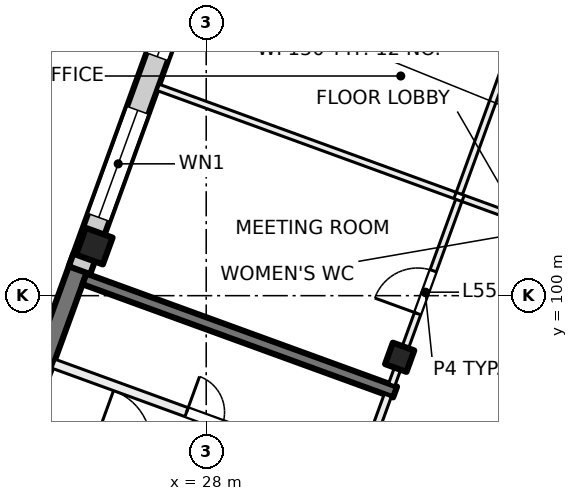
"""IFC4 building model, lengths in metres.
Left out: names, types, materials, properties, quantities, classifications, styles, units other than length and angle.
Written with IfcOpenShell. Run it as: python <this file> out.ifc"""

import sys

from ifc_helpers import new_model, si_unit, direction, frame, frame_2d, origin, origin_2d, place, context, subcontext, project, spatial, rectangle, extrude, element, fill, save


model = new_model("IFC4")
c1 = context("Model", 3, precision=1e-05, world=origin(), true_north=direction((0.0, 1.0)))
c2 = subcontext(c1, "Body", "Model", "MODEL_VIEW")
j1 = project(units=[si_unit("LENGTHUNIT", "METRE"), si_unit("PLANEANGLEUNIT", "RADIAN")], contexts=[c1])
p1 = place(None, origin())
s1 = spatial("IfcSite", under=j1, at=p1, CompositionType="ELEMENT")
p2 = place(p1, origin())
s2 = spatial("IfcBuilding", under=s1, at=p2, CompositionType="ELEMENT")
p3 = place(p2, frame((0.0, 0.0, 232.0)))
s3 = spatial("IfcBuildingStorey", under=s2, at=p3, CompositionType="ELEMENT", Elevation=232.0)
p4 = place(p3, frame((33.091, 98.379, 0.0), z_axis=(0.0, 0.0, 1.0), x_axis=(-0.342020143326, -0.939692620786, 0.0)))
e1 = element("IfcColumn", 1, at=p4, inside=s3, PredefinedType="COLUMN", context=c2, shape_type="SweptSolid", body=[
    extrude(rectangle(XDim=0.6, YDim=0.6, at=origin_2d()), origin(), (0.0, 0.0, 1.0), 4.0),
])
p5 = place(p3, frame((25.056, 101.303, 0.0), z_axis=(0.0, 0.0, 1.0), x_axis=(-0.342020143326, -0.939692620786, 0.0)))
e2 = element("IfcColumn", 2, at=p5, inside=s3, PredefinedType="COLUMN", context=c2, shape_type="SweptSolid", body=[
    extrude(rectangle(XDim=0.75, YDim=0.75, at=origin_2d()), origin(), (0.0, 0.0, 1.0), 4.0),
])
p6 = place(p3, frame((21.67, 92.585, 0.0), z_axis=(0.0, 0.0, 1.0), x_axis=(0.342035714298, 0.93968695327, 0.0)))
e3 = element("IfcWall", 3, at=p6, inside=s3, PredefinedType="SHEAR", context=c2, shape_type="SweptSolid", body=[
    extrude(rectangle(XDim=8.975, YDim=0.5, at=frame_2d((4.488, 0.0))), origin(), (0.0, 0.0, 1.0), 4.0),
])
p7 = place(p3, frame((32.971, 97.465, 0.0), z_axis=(0.0, 0.0, 1.0), x_axis=(-0.939695066972, 0.34201342241, 0.0)))
e4 = element("IfcWall", 4, at=p7, inside=s3, PredefinedType="SHEAR", context=c2, shape_type="SweptSolid", body=[
    extrude(rectangle(XDim=8.7, YDim=0.3, at=frame_2d((4.35, 0.0))), origin(), (0.0, 0.0, 1.0), 4.0),
])
p8 = place(p3, frame((24.666, 100.669, 0.0), z_axis=(0.0, 0.0, 1.0), x_axis=(0.34201964167, 0.939692803373, 0.0)))
e5 = element("IfcWall", 5, at=p8, inside=s3, PredefinedType="SOLIDWALL", context=c2, shape_type="SweptSolid", body=[
    extrude(rectangle(XDim=32.884, YDim=0.6, at=frame_2d((16.442, 0.0))), origin(), (0.0, 0.0, 1.0), 3.625),
])
p9 = place(p8, frame((1.48, 0.0, 0.9)))
e6 = element("IfcOpeningElement", 6, at=p9, cuts=e5, PredefinedType="OPENING", context=c2, shape_type="SweptSolid", body=[
    extrude(rectangle(XDim=3.0, YDim=2.4, at=frame_2d((1.5, 1.2))), frame((0.0, 0.31, 0.0), z_axis=(0.0, -1.0, 0.0), x_axis=(1.0, 0.0, 0.0)), (0.0, 0.0, 1.0), 0.62),
])
p10 = place(p8, frame((5.98, 0.0, 0.9)))
e7 = element("IfcOpeningElement", 7, at=p10, cuts=e5, PredefinedType="OPENING", context=c2, shape_type="SweptSolid", body=[
    extrude(rectangle(XDim=3.0, YDim=2.4, at=frame_2d((1.5, 1.2))), frame((0.0, 0.31, 0.0), z_axis=(0.0, -1.0, 0.0), x_axis=(1.0, 0.0, 0.0)), (0.0, 0.0, 1.0), 0.62),
])
p11 = place(p8, frame((10.48, 0.0, 0.9)))
e8 = element("IfcOpeningElement", 8, at=p11, cuts=e5, PredefinedType="OPENING", context=c2, shape_type="SweptSolid", body=[
    extrude(rectangle(XDim=3.0, YDim=2.4, at=frame_2d((1.5, 1.2))), frame((0.0, 0.31, 0.0), z_axis=(0.0, -1.0, 0.0), x_axis=(1.0, 0.0, 0.0)), (0.0, 0.0, 1.0), 0.62),
])
p12 = place(p8, frame((14.98, 0.0, 0.9)))
e9 = element("IfcOpeningElement", 9, at=p12, cuts=e5, PredefinedType="OPENING", context=c2, shape_type="SweptSolid", body=[
    extrude(rectangle(XDim=3.0, YDim=2.4, at=frame_2d((1.5, 1.2))), frame((0.0, 0.31, 0.0), z_axis=(0.0, -1.0, 0.0), x_axis=(1.0, 0.0, 0.0)), (0.0, 0.0, 1.0), 0.62),
])
p13 = place(p8, frame((19.48, 0.0, 0.9)))
e10 = element("IfcOpeningElement", 10, at=p13, cuts=e5, PredefinedType="OPENING", context=c2, shape_type="SweptSolid", body=[
    extrude(rectangle(XDim=3.0, YDim=2.4, at=frame_2d((1.5, 1.2))), frame((0.0, 0.31, 0.0), z_axis=(0.0, -1.0, 0.0), x_axis=(1.0, 0.0, 0.0)), (0.0, 0.0, 1.0), 0.62),
])
p14 = place(p8, frame((23.98, 0.0, 0.9)))
e11 = element("IfcOpeningElement", 11, at=p14, cuts=e5, PredefinedType="OPENING", context=c2, shape_type="SweptSolid", body=[
    extrude(rectangle(XDim=3.0, YDim=2.4, at=frame_2d((1.5, 1.2))), frame((0.0, 0.31, 0.0), z_axis=(0.0, -1.0, 0.0), x_axis=(1.0, 0.0, 0.0)), (0.0, 0.0, 1.0), 0.62),
])
p15 = place(p8, frame((28.48, 0.0, 0.9)))
e12 = element("IfcOpeningElement", 12, at=p15, cuts=e5, PredefinedType="OPENING", context=c2, shape_type="SweptSolid", body=[
    extrude(rectangle(XDim=3.0, YDim=2.4, at=frame_2d((1.5, 1.2))), frame((0.0, 0.31, 0.0), z_axis=(0.0, -1.0, 0.0), x_axis=(1.0, 0.0, 0.0)), (0.0, 0.0, 1.0), 0.62),
])
p16 = place(p3, frame((31.427, 93.663, 0.0), z_axis=(0.0, 0.0, 1.0), x_axis=(0.342030870568, 0.93968871632, 0.0)))
e13 = element("IfcWall", 13, at=p16, inside=s3, PredefinedType="PARTITIONING", context=c2, shape_type="SweptSolid", body=[
    extrude(rectangle(XDim=3.95, YDim=0.2, at=frame_2d((1.975, 0.0))), origin(), (0.0, 0.0, 1.0), 3.625),
])
p17 = place(p16, frame((0.3, 0.0, 0.0)))
e14 = element("IfcOpeningElement", 14, at=p17, cuts=e13, PredefinedType="OPENING", context=c2, shape_type="SweptSolid", body=[
    extrude(rectangle(XDim=1.2, YDim=2.1, at=frame_2d((0.6, 1.05))), frame((0.0, 0.11, 0.0), z_axis=(0.0, -1.0, 0.0), x_axis=(1.0, 0.0, 0.0)), (0.0, 0.0, 1.0), 0.22),
])
p18 = place(p3, frame((23.427, 96.682, 0.0), z_axis=(0.0, 0.0, 1.0), x_axis=(0.939690465531, -0.342026064782, 0.0)))
e15 = element("IfcWall", 15, at=p18, inside=s3, PredefinedType="PARTITIONING", context=c2, shape_type="SweptSolid", body=[
    extrude(rectangle(XDim=8.45, YDim=0.2, at=frame_2d((4.225, 0.0))), origin(), (0.0, 0.0, 1.0), 3.625),
])
p19 = place(p18, frame((1.725, 0.0, 0.0)))
e16 = element("IfcOpeningElement", 16, at=p19, cuts=e15, PredefinedType="OPENING", context=c2, shape_type="SweptSolid", body=[
    extrude(rectangle(XDim=1.5, YDim=2.1, at=frame_2d((0.75, 1.05))), frame((0.0, 0.11, 0.0), z_axis=(0.0, -1.0, 0.0), x_axis=(1.0, 0.0, 0.0)), (0.0, 0.0, 1.0), 0.22),
])
p20 = place(p3, frame((23.983, 98.208, 0.0), z_axis=(0.0, 0.0, 1.0), x_axis=(0.939699751196, -0.342000552051, 0.0)))
e17 = element("IfcWall", 17, at=p20, inside=s3, PredefinedType="PARTITIONING", context=c2, shape_type="SweptSolid", body=[
    extrude(rectangle(XDim=8.45, YDim=0.25, at=frame_2d((4.225, 0.0))), origin(), (0.0, 0.0, 1.0), 3.625),
])
p21 = place(p20, frame((3.725, 0.0, 0.0)))
e18 = element("IfcOpeningElement", 18, at=p21, cuts=e17, PredefinedType="OPENING", context=c2, shape_type="SweptSolid", body=[
    extrude(rectangle(XDim=1.0, YDim=2.1, at=frame_2d((0.5, 1.05))), frame((0.0, 0.135, 0.0), z_axis=(0.0, -1.0, 0.0), x_axis=(1.0, 0.0, 0.0)), (0.0, 0.0, 1.0), 0.27),
])
p22 = place(p3, frame((26.736, 105.48, 0.0), z_axis=(0.0, 0.0, 1.0), x_axis=(0.939705074886, -0.341985924028, 0.0)))
e19 = element("IfcWall", 19, at=p22, inside=s3, PredefinedType="PARTITIONING", context=c2, shape_type="SweptSolid", body=[
    extrude(rectangle(XDim=8.313, YDim=0.175, at=frame_2d((4.157, 0.0))), origin(), (0.0, 0.0, 1.0), 3.625),
])
p23 = place(p3, frame((32.881, 97.657, 0.0), z_axis=(0.0, 0.0, 1.0), x_axis=(0.342058204353, 0.939678766832, 0.0)))
e20 = element("IfcWall", 20, at=p23, inside=s3, PredefinedType="PARTITIONING", context=c2, shape_type="SweptSolid", body=[
    extrude(rectangle(XDim=5.163, YDim=0.175, at=frame_2d((2.581, 0.0))), origin(), (0.0, 0.0, 1.0), 3.625),
])
p24 = place(p23, frame((1.991, 0.0, 0.0)))
e21 = element("IfcOpeningElement", 21, at=p24, cuts=e20, PredefinedType="OPENING", context=c2, shape_type="SweptSolid", body=[
    extrude(rectangle(XDim=1.2, YDim=2.1, at=frame_2d((0.6, 1.05))), frame((0.0, 0.097, 0.0), z_axis=(0.0, -1.0, 0.0), x_axis=(1.0, 0.0, 0.0)), (0.0, 0.0, 1.0), 0.195),
])
p25 = place(p3, frame((34.759, 102.56, 0.0), z_axis=(0.0, 0.0, 1.0), x_axis=(0.939770757411, -0.341805388365, 0.0)))
e22 = element("IfcWall", 22, at=p25, inside=s3, PredefinedType="PARTITIONING", context=c2, shape_type="SweptSolid", body=[
    extrude(rectangle(XDim=3.774, YDim=0.175, at=frame_2d((1.887, 0.0))), origin(), (0.0, 0.0, 1.0), 3.625),
])
p26 = place(p3, frame((34.66, 102.689, 0.0), z_axis=(0.0, 0.0, 1.0), x_axis=(0.341951828534, 0.939717482524, 0.0)))
e23 = element("IfcWall", 23, at=p26, inside=s3, PredefinedType="PARTITIONING", context=c2, shape_type="SweptSolid", body=[
    extrude(rectangle(XDim=8.826, YDim=0.175, at=frame_2d((4.413, 0.0))), origin(), (0.0, 0.0, 1.0), 3.625),
])
p27 = place(p26, frame((4.813, 0.0, 0.0)))
e24 = element("IfcOpeningElement", 24, at=p27, cuts=e23, PredefinedType="OPENING", context=c2, shape_type="SweptSolid", body=[
    extrude(rectangle(XDim=1.2, YDim=2.1, at=frame_2d((0.6, 1.05))), frame((0.0, 0.097, 0.0), z_axis=(0.0, -1.0, 0.0), x_axis=(1.0, 0.0, 0.0)), (0.0, 0.0, 1.0), 0.195),
])
p28 = place(p9, origin())
e25 = element("IfcWindow", 25, at=p28, inside=s3, PartitioningType="SINGLE_PANEL", PredefinedType="WINDOW", context=c2, shape_type="SweptSolid", body=[
    extrude(rectangle(XDim=3.0, YDim=2.4, at=frame_2d((1.5, 1.2))), frame((0.0, 0.03, 0.0), z_axis=(0.0, -1.0, 0.0), x_axis=(1.0, 0.0, 0.0)), (0.0, 0.0, 1.0), 0.06),
])
fill(e6, e25)
p29 = place(p10, origin())
e26 = element("IfcWindow", 26, at=p29, inside=s3, PartitioningType="SINGLE_PANEL", PredefinedType="WINDOW", context=c2, shape_type="SweptSolid", body=[
    extrude(rectangle(XDim=3.0, YDim=2.4, at=frame_2d((1.5, 1.2))), frame((0.0, 0.03, 0.0), z_axis=(0.0, -1.0, 0.0), x_axis=(1.0, 0.0, 0.0)), (0.0, 0.0, 1.0), 0.06),
])
fill(e7, e26)
p30 = place(p21, origin())
e27 = element("IfcDoor", 27, at=p30, inside=s3, OperationType="SINGLE_SWING_LEFT", PredefinedType="DOOR", context=c2, shape_type="SweptSolid", body=[
    extrude(rectangle(XDim=1.0, YDim=2.1, at=frame_2d((0.5, 1.05))), frame((0.0, 0.025, 0.0), z_axis=(0.0, -1.0, 0.0), x_axis=(1.0, 0.0, 0.0)), (0.0, 0.0, 1.0), 0.05),
])
fill(e18, e27)
p31 = place(p24, origin())
e28 = element("IfcDoor", 28, at=p31, inside=s3, OperationType="DOUBLE_DOOR_SINGLE_SWING", PredefinedType="DOOR", context=c2, shape_type="SweptSolid", body=[
    extrude(rectangle(XDim=1.2, YDim=2.1, at=frame_2d((0.6, 1.05))), frame((0.0, 0.025, 0.0), z_axis=(0.0, -1.0, 0.0), x_axis=(1.0, 0.0, 0.0)), (0.0, 0.0, 1.0), 0.05),
])
fill(e21, e28)
save(model, sys.argv[1])
